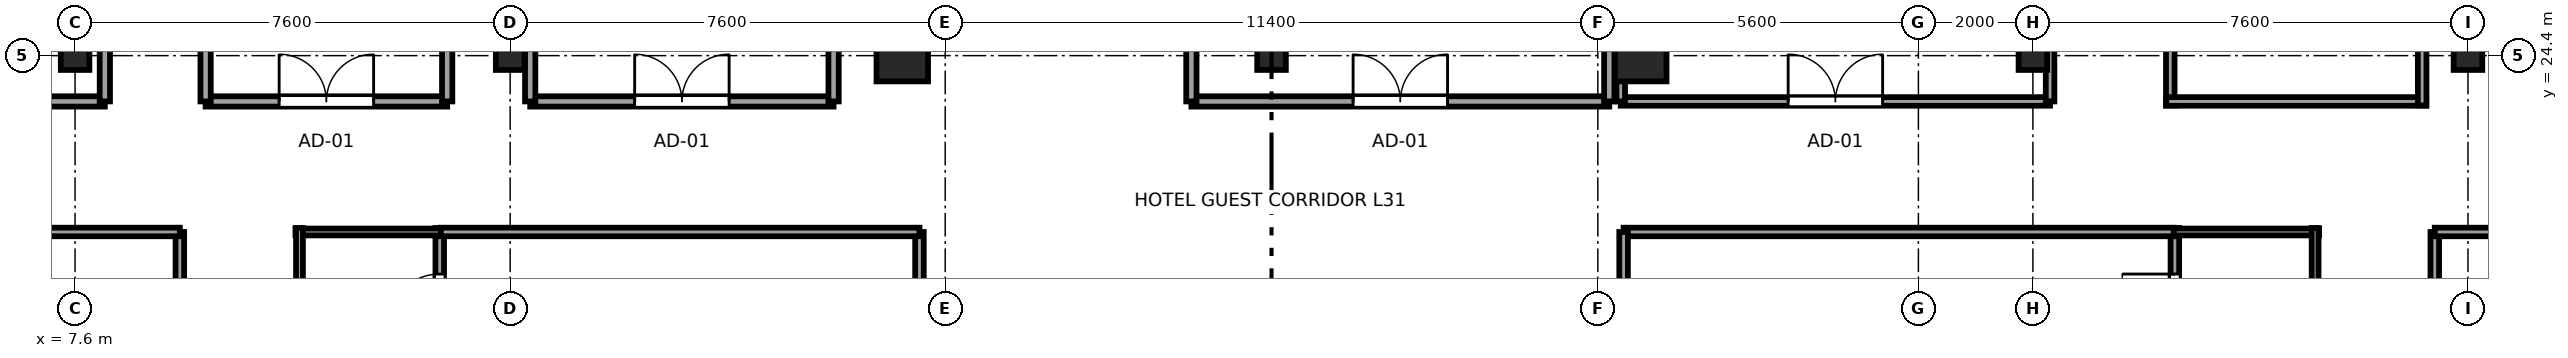
"""IFC4 building model, lengths in metres.
Left out: names, types, materials, properties, quantities, classifications, styles, units other than length and angle.
Written with IfcOpenShell. Run it as: python <this file> out.ifc"""

import sys

from ifc_helpers import new_model, si_unit, direction, frame, frame_2d, origin, origin_2d, place, context, subcontext, project, spatial, rectangle, i_section, extrude, source, transform, mapped, element, fill, save


model = new_model("IFC4")
c1 = context("Model", 3, precision=1e-05, world=origin(), true_north=direction((0.0, 1.0)))
c2 = subcontext(c1, "Body", "Model", "MODEL_VIEW")
j1 = project(units=[si_unit("LENGTHUNIT", "METRE"), si_unit("PLANEANGLEUNIT", "RADIAN")], contexts=[c1])
p1 = place(None, origin())
s1 = spatial("IfcSite", under=j1, at=p1, CompositionType="ELEMENT")
p2 = place(p1, origin())
s2 = spatial("IfcBuilding", under=s1, at=p2, CompositionType="ELEMENT")
p3 = place(p2, frame((0.0, 0.0, 122.2)))
s3 = spatial("IfcBuildingStorey", under=s2, at=p3, CompositionType="ELEMENT", Elevation=122.2)
m1 = source(origin(), c2, "Body", "SweptSolid", [
    extrude(i_section(OverallWidth=0.5, OverallDepth=0.5, WebThickness=0.022, FlangeThickness=0.034, at=origin_2d()), origin(), (0.0, 0.0, 1.0), 3.55),
])
for number, where, z_axis, x_axis in (
    (1, (7.6, 24.4, 0.0), (0.0, 0.0, 1.0), (1.0, 0.0, 0.0)),
    (2, (15.2, 24.4, 0.0), (0.0, 0.0, 1.0), (1.0, 0.0, 0.0)),
):
    element("IfcColumn", number, at=place(p3, frame(where, z_axis=z_axis, x_axis=x_axis)), inside=s3, PredefinedType="COLUMN", context=c2, shape_type="MappedRepresentation", body=[
        mapped(m1, transform((0.0, 0.0, 0.0), x_axis=(1.0, 0.0, 0.0), y_axis=(0.0, 1.0, 0.0), z_axis=(0.0, 0.0, 1.0), scale=1.0)),
    ])
m2 = source(origin(), c2, "Body", "SweptSolid", [
    extrude(rectangle(XDim=0.9, YDim=0.9, at=origin_2d()), origin(), (0.0, 0.0, 1.0), 3.55),
])
for number, where, z_axis, x_axis in (
    (3, (22.05, 24.4, 0.0), (0.0, 0.0, 1.0), (1.0, 0.0, 0.0)),
    (4, (34.95, 24.4, 0.0), (0.0, 0.0, 1.0), (1.0, 0.0, 0.0)),
):
    element("IfcColumn", number, at=place(p3, frame(where, z_axis=z_axis, x_axis=x_axis)), inside=s3, PredefinedType="COLUMN", context=c2, shape_type="MappedRepresentation", body=[
        mapped(m2, transform((0.0, 0.0, 0.0), x_axis=(1.0, 0.0, 0.0), y_axis=(0.0, 1.0, 0.0), z_axis=(0.0, 0.0, 1.0), scale=1.0)),
    ])
for number, where, z_axis, x_axis in (
    (5, (41.8, 24.4, 0.0), (0.0, 0.0, 1.0), (1.0, 0.0, 0.0)),
    (6, (49.4, 24.4, 0.0), (0.0, 0.0, 1.0), (1.0, 0.0, 0.0)),
    (7, (28.5, 24.4, 0.0), (0.0, 0.0, 1.0), (1.0, 0.0, 0.0)),
):
    element("IfcColumn", number, at=place(p3, frame(where, z_axis=z_axis, x_axis=x_axis)), inside=s3, PredefinedType="COLUMN", context=c2, shape_type="MappedRepresentation", body=[
        mapped(m1, transform((0.0, 0.0, 0.0), x_axis=(1.0, 0.0, 0.0), y_axis=(0.0, 1.0, 0.0), z_axis=(0.0, 0.0, 1.0), scale=1.0)),
    ])
p4 = place(p3, frame((13.97, 19.0, 0.0), z_axis=(0.0, 0.0, 1.0), x_axis=(0.0, 1.0, 0.0)))
e8 = element("IfcWall", 8, at=p4, inside=s3, PredefinedType="PARTITIONING", context=c2, shape_type="SweptSolid", body=[
    extrude(rectangle(XDim=2.39, YDim=0.15, at=frame_2d((1.195, 0.0))), origin(), (0.0, 0.0, 1.0), 3.37),
])
p5 = place(p4, frame((0.665, 0.0, 0.0)))
e9 = element("IfcOpeningElement", 9, at=p5, cuts=e8, PredefinedType="OPENING", context=c2, shape_type="SweptSolid", body=[
    extrude(rectangle(XDim=0.92, YDim=2.01, at=frame_2d((0.46, 1.005))), frame((0.0, 0.085, 0.0), z_axis=(0.0, -1.0, 0.0), x_axis=(1.0, 0.0, 0.0)), (0.0, 0.0, 1.0), 0.17),
])
p6 = place(p3, frame((11.45, 21.32, 0.0), z_axis=(0.0, 0.0, 1.0), x_axis=(1.0, 0.0, 0.0)))
e10 = element("IfcWall", 10, at=p6, inside=s3, PredefinedType="PLUMBINGWALL", context=c2, shape_type="SweptSolid", body=[
    extrude(rectangle(XDim=2.59, YDim=0.12, at=frame_2d((1.295, 0.0))), origin(), (0.0, 0.0, 1.0), 3.37),
])
p7 = place(p3, frame((11.52, 19.0, 0.0), z_axis=(0.0, 0.0, 1.0), x_axis=(0.0, 1.0, 0.0)))
e11 = element("IfcWall", 11, at=p7, inside=s3, PredefinedType="PLUMBINGWALL", context=c2, shape_type="SweptSolid", body=[
    extrude(rectangle(XDim=2.39, YDim=0.12, at=frame_2d((1.195, 0.0))), origin(), (0.0, 0.0, 1.0), 2.954),
])
p8 = place(p3, frame((44.28, 19.0, 0.0), z_axis=(0.0, 0.0, 1.0), x_axis=(0.0, 1.0, 0.0)))
e12 = element("IfcWall", 12, at=p8, inside=s3, PredefinedType="PARTITIONING", context=c2, shape_type="SweptSolid", body=[
    extrude(rectangle(XDim=2.39, YDim=0.15, at=frame_2d((1.195, 0.0))), origin(), (0.0, 0.0, 1.0), 3.37),
])
p9 = place(p8, frame((0.665, 0.0, 0.0)))
e13 = element("IfcOpeningElement", 13, at=p9, cuts=e12, PredefinedType="OPENING", context=c2, shape_type="SweptSolid", body=[
    extrude(rectangle(XDim=0.92, YDim=2.01, at=frame_2d((0.46, 1.005))), frame((0.0, 0.085, 0.0), z_axis=(0.0, -1.0, 0.0), x_axis=(1.0, 0.0, 0.0)), (0.0, 0.0, 1.0), 0.17),
])
p10 = place(p3, frame((44.21, 21.32, 0.0), z_axis=(0.0, 0.0, 1.0), x_axis=(1.0, 0.0, 0.0)))
e14 = element("IfcWall", 14, at=p10, inside=s3, PredefinedType="PLUMBINGWALL", context=c2, shape_type="SweptSolid", body=[
    extrude(rectangle(XDim=2.59, YDim=0.12, at=frame_2d((1.295, 0.0))), origin(), (0.0, 0.0, 1.0), 3.37),
])
p11 = place(p3, frame((46.73, 19.0, 0.0), z_axis=(0.0, 0.0, 1.0), x_axis=(0.0, 1.0, 0.0)))
e15 = element("IfcWall", 15, at=p11, inside=s3, PredefinedType="PLUMBINGWALL", context=c2, shape_type="SweptSolid", body=[
    extrude(rectangle(XDim=2.39, YDim=0.12, at=frame_2d((1.195, 0.0))), origin(), (0.0, 0.0, 1.0), 3.37),
])
p12 = place(p3, frame((9.43, 13.21, 0.0), z_axis=(0.0, 0.0, 1.0), x_axis=(0.0, 1.0, 0.0)))
e16 = element("IfcWall", 16, at=p12, inside=s3, PredefinedType="PARTITIONING", context=c2, shape_type="SweptSolid", body=[
    extrude(rectangle(XDim=8.11, YDim=0.15, at=frame_2d((4.055, 0.0))), origin(), (0.0, 0.0, 1.0), 3.37),
])
p13 = place(p12, frame((3.545, 0.0, 0.0)))
e17 = element("IfcOpeningElement", 17, at=p13, cuts=e16, PredefinedType="OPENING", context=c2, shape_type="SweptSolid", body=[
    extrude(rectangle(XDim=0.98, YDim=2.12, at=frame_2d((0.49, 1.06))), frame((0.0, 0.085, 0.0), z_axis=(0.0, -1.0, 0.0), x_axis=(1.0, 0.0, 0.0)), (0.0, 0.0, 1.0), 0.17),
])
p14 = place(p3, frame((0.405, 21.32, 0.0), z_axis=(0.0, 0.0, 1.0), x_axis=(1.0, 0.0, 0.0)))
e18 = element("IfcWall", 18, at=p14, inside=s3, PredefinedType="PARTITIONING", context=c2, shape_type="SweptSolid", body=[
    extrude(rectangle(XDim=9.025, YDim=0.15, at=frame_2d((4.512, 0.0))), origin(), (0.0, 0.0, 1.0), 3.37),
])
p15 = place(p3, frame((22.35, 8.28, 0.0), z_axis=(0.0, 0.0, 1.0), x_axis=(0.0, 1.0, 0.0)))
e19 = element("IfcWall", 19, at=p15, inside=s3, PredefinedType="PARTITIONING", context=c2, shape_type="SweptSolid", body=[
    extrude(rectangle(XDim=13.04, YDim=0.15, at=frame_2d((6.52, 0.0))), origin(), (0.0, 0.0, 1.0), 3.37),
])
p16 = place(p3, frame((13.99, 21.32, 0.0), z_axis=(0.0, 0.0, 1.0), x_axis=(1.0, 0.0, 0.0)))
e20 = element("IfcWall", 20, at=p16, inside=s3, PredefinedType="PARTITIONING", context=c2, shape_type="SweptSolid", body=[
    extrude(rectangle(XDim=8.36, YDim=0.15, at=frame_2d((4.18, 0.0))), origin(), (0.0, 0.0, 1.0), 3.37),
])
p17 = place(p3, frame((34.65, 21.32, 0.0), z_axis=(0.0, 0.0, 1.0), x_axis=(1.0, 0.0, 0.0)))
e21 = element("IfcWall", 21, at=p17, inside=s3, PredefinedType="PARTITIONING", context=c2, shape_type="SweptSolid", body=[
    extrude(rectangle(XDim=9.61, YDim=0.15, at=frame_2d((4.805, 0.0))), origin(), (0.0, 0.0, 1.0), 3.37),
])
p18 = place(p3, frame((34.65, 8.23, 0.0), z_axis=(0.0, 0.0, 1.0), x_axis=(0.0, 1.0, 0.0)))
e22 = element("IfcWall", 22, at=p18, inside=s3, PredefinedType="PARTITIONING", context=c2, shape_type="SweptSolid", body=[
    extrude(rectangle(XDim=13.09, YDim=0.15, at=frame_2d((6.545, 0.0))), origin(), (0.0, 0.0, 1.0), 3.37),
])
p19 = place(p3, frame((48.82, 13.21, 0.0), z_axis=(0.0, 0.0, 1.0), x_axis=(0.0, 1.0, 0.0)))
e23 = element("IfcWall", 23, at=p19, inside=s3, PredefinedType="PARTITIONING", context=c2, shape_type="SweptSolid", body=[
    extrude(rectangle(XDim=8.11, YDim=0.15, at=frame_2d((4.055, 0.0))), origin(), (0.0, 0.0, 1.0), 3.37),
])
p20 = place(p19, frame((4.145, 0.0, 0.0)))
e24 = element("IfcOpeningElement", 24, at=p20, cuts=e23, PredefinedType="OPENING", context=c2, shape_type="SweptSolid", body=[
    extrude(rectangle(XDim=0.98, YDim=2.12, at=frame_2d((0.49, 1.06))), frame((0.0, 0.085, 0.0), z_axis=(0.0, -1.0, 0.0), x_axis=(1.0, 0.0, 0.0)), (0.0, 0.0, 1.0), 0.17),
])
p21 = place(p3, frame((48.82, 21.32, 0.0), z_axis=(0.0, 0.0, 1.0), x_axis=(1.0, 0.0, 0.0)))
e25 = element("IfcWall", 25, at=p21, inside=s3, PredefinedType="PARTITIONING", context=c2, shape_type="SweptSolid", body=[
    extrude(rectangle(XDim=7.88, YDim=0.15, at=frame_2d((3.94, 0.0))), origin(), (0.0, 0.0, 1.0), 3.37),
])
p22 = place(p3, frame((0.405, 23.6, 0.0), z_axis=(0.0, 0.0, 1.0), x_axis=(1.0, 0.0, 0.0)))
e26 = element("IfcWall", 26, at=p22, inside=s3, PredefinedType="PARTITIONING", context=c2, shape_type="SweptSolid", body=[
    extrude(rectangle(XDim=7.715, YDim=0.18, at=frame_2d((3.857, 0.0))), origin(), (0.0, 0.0, 1.0), 3.37),
])
p23 = place(p3, frame((8.12, 23.6, 0.0), z_axis=(0.0, 0.0, 1.0), x_axis=(0.0, 1.0, 0.0)))
e27 = element("IfcWall", 27, at=p23, inside=s3, PredefinedType="PARTITIONING", context=c2, shape_type="SweptSolid", body=[
    extrude(rectangle(XDim=7.6, YDim=0.18, at=frame_2d((3.8, 0.0))), origin(), (0.0, 0.0, 1.0), 3.37),
])
p24 = place(p23, frame((2.975, 0.0, 0.0)))
e28 = element("IfcOpeningElement", 28, at=p24, cuts=e27, PredefinedType="OPENING", context=c2, shape_type="SweptSolid", body=[
    extrude(rectangle(XDim=1.65, YDim=2.15, at=frame_2d((0.825, 1.075))), frame((0.0, 0.1, 0.0), z_axis=(0.0, -1.0, 0.0), x_axis=(1.0, 0.0, 0.0)), (0.0, 0.0, 1.0), 0.2),
])
p25 = place(p3, frame((44.2, 23.53, 0.0), z_axis=(0.0, 0.0, 1.0), x_axis=(0.0, 1.0, 0.0)))
e29 = element("IfcWall", 29, at=p25, inside=s3, PredefinedType="PARTITIONING", context=c2, shape_type="SweptSolid", body=[
    extrude(rectangle(XDim=3.74, YDim=0.15, at=frame_2d((1.87, 0.0))), origin(), (0.0, 0.0, 1.0), 3.37),
])
p26 = place(p25, frame((1.24, 0.0, 0.0)))
e30 = element("IfcOpeningElement", 30, at=p26, cuts=e29, PredefinedType="OPENING", context=c2, shape_type="SweptSolid", body=[
    extrude(rectangle(XDim=0.92, YDim=2.01, at=frame_2d((0.46, 1.005))), frame((0.0, 0.085, 0.0), z_axis=(0.0, -1.0, 0.0), x_axis=(1.0, 0.0, 0.0)), (0.0, 0.0, 1.0), 0.17),
])
p27 = place(p3, frame((44.13, 23.6, 0.0), z_axis=(0.0, 0.0, 1.0), x_axis=(1.0, 0.0, 0.0)))
e31 = element("IfcWall", 31, at=p27, inside=s3, PredefinedType="PARTITIONING", context=c2, shape_type="SweptSolid", body=[
    extrude(rectangle(XDim=4.54, YDim=0.15, at=frame_2d((2.27, 0.0))), origin(), (0.0, 0.0, 1.0), 3.37),
])
p28 = place(p3, frame((48.6, 23.53, 0.0), z_axis=(0.0, 0.0, 1.0), x_axis=(0.0, 1.0, 0.0)))
e32 = element("IfcWall", 32, at=p28, inside=s3, PredefinedType="PARTITIONING", context=c2, shape_type="SweptSolid", body=[
    extrude(rectangle(XDim=3.74, YDim=0.15, at=frame_2d((1.87, 0.0))), origin(), (0.0, 0.0, 1.0), 3.37),
])
p29 = place(p3, frame((9.88, 23.6, 0.0), z_axis=(0.0, 0.0, 1.0), x_axis=(1.0, 0.0, 0.0)))
e33 = element("IfcWall", 33, at=p29, inside=s3, PredefinedType="PARTITIONING", context=c2, shape_type="SweptSolid", body=[
    extrude(rectangle(XDim=4.22, YDim=0.18, at=frame_2d((2.11, 0.0))), origin(), (0.0, 0.0, 1.0), 3.37),
])
p30 = place(p29, frame((1.285, 0.0, 0.0)))
e34 = element("IfcOpeningElement", 34, at=p30, cuts=e33, PredefinedType="OPENING", context=c2, shape_type="SweptSolid", body=[
    extrude(rectangle(XDim=1.65, YDim=2.15, at=frame_2d((0.825, 1.075))), frame((0.0, 0.1, 0.0), z_axis=(0.0, -1.0, 0.0), x_axis=(1.0, 0.0, 0.0)), (0.0, 0.0, 1.0), 0.2),
])
for number, where, z_axis, x_axis in (
    (35, (9.88, 23.6, 0.0), (0.0, 0.0, 1.0), (0.0, 1.0, 0.0)),
    (36, (14.1, 23.6, 0.0), (0.0, 0.0, 1.0), (0.0, 1.0, 0.0)),
):
    element("IfcWall", number, at=place(p3, frame(where, z_axis=z_axis, x_axis=x_axis)), inside=s3, PredefinedType="PARTITIONING", context=c2, shape_type="SweptSolid", body=[
        extrude(rectangle(XDim=6.15, YDim=0.18, at=frame_2d((3.075, 0.0))), origin(), (0.0, 0.0, 1.0), 3.37),
    ])
p31 = place(p3, frame((27.1, 23.6, 0.0), z_axis=(0.0, 0.0, 1.0), x_axis=(1.0, 0.0, 0.0)))
e37 = element("IfcWall", 37, at=p31, inside=s3, PredefinedType="PARTITIONING", context=c2, shape_type="SweptSolid", body=[
    extrude(rectangle(XDim=7.3, YDim=0.18, at=frame_2d((3.65, 0.0))), origin(), (0.0, 0.0, 1.0), 3.37),
])
p32 = place(p31, frame((2.825, 0.0, 0.0)))
e38 = element("IfcOpeningElement", 38, at=p32, cuts=e37, PredefinedType="OPENING", context=c2, shape_type="SweptSolid", body=[
    extrude(rectangle(XDim=1.65, YDim=2.15, at=frame_2d((0.825, 1.075))), frame((0.0, 0.1, 0.0), z_axis=(0.0, -1.0, 0.0), x_axis=(1.0, 0.0, 0.0)), (0.0, 0.0, 1.0), 0.2),
])
for number, where, z_axis, x_axis in (
    (39, (27.1, 23.6, 0.0), (0.0, 0.0, 1.0), (0.0, 1.0, 0.0)),
    (40, (34.4, 23.6, 0.0), (0.0, 0.0, 1.0), (0.0, 1.0, 0.0)),
):
    element("IfcWall", number, at=place(p3, frame(where, z_axis=z_axis, x_axis=x_axis)), inside=s3, PredefinedType="PARTITIONING", context=c2, shape_type="SweptSolid", body=[
        extrude(rectangle(XDim=6.2, YDim=0.18, at=frame_2d((3.1, 0.0))), origin(), (0.0, 0.0, 1.0), 3.37),
    ])
p33 = place(p3, frame((15.55, 23.6, 0.0), z_axis=(0.0, 0.0, 1.0), x_axis=(1.0, 0.0, 0.0)))
e41 = element("IfcWall", 41, at=p33, inside=s3, PredefinedType="PARTITIONING", context=c2, shape_type="SweptSolid", body=[
    extrude(rectangle(XDim=5.3, YDim=0.18, at=frame_2d((2.65, 0.0))), origin(), (0.0, 0.0, 1.0), 3.37),
])
p34 = place(p33, frame((1.825, 0.0, 0.0)))
e42 = element("IfcOpeningElement", 42, at=p34, cuts=e41, PredefinedType="OPENING", context=c2, shape_type="SweptSolid", body=[
    extrude(rectangle(XDim=1.65, YDim=2.15, at=frame_2d((0.825, 1.075))), frame((0.0, 0.1, 0.0), z_axis=(0.0, -1.0, 0.0), x_axis=(1.0, 0.0, 0.0)), (0.0, 0.0, 1.0), 0.2),
])
for number, where, z_axis, x_axis in (
    (43, (15.55, 23.6, 0.0), (0.0, 0.0, 1.0), (0.0, 1.0, 0.0)),
    (44, (20.85, 23.6, 0.0), (0.0, 0.0, 1.0), (0.0, 1.0, 0.0)),
):
    element("IfcWall", number, at=place(p3, frame(where, z_axis=z_axis, x_axis=x_axis)), inside=s3, PredefinedType="PARTITIONING", context=c2, shape_type="SweptSolid", body=[
        extrude(rectangle(XDim=6.2, YDim=0.18, at=frame_2d((3.1, 0.0))), origin(), (0.0, 0.0, 1.0), 3.37),
    ])
p35 = place(p3, frame((34.6, 23.6, 0.0), z_axis=(0.0, 0.0, 1.0), x_axis=(1.0, 0.0, 0.0)))
e45 = element("IfcWall", 45, at=p35, inside=s3, PredefinedType="PARTITIONING", context=c2, shape_type="SweptSolid", body=[
    extrude(rectangle(XDim=7.5, YDim=0.15, at=frame_2d((3.75, 0.0))), origin(), (0.0, 0.0, 1.0), 3.37),
])
p36 = place(p35, frame((2.925, 0.0, 0.0)))
e46 = element("IfcOpeningElement", 46, at=p36, cuts=e45, PredefinedType="OPENING", context=c2, shape_type="SweptSolid", body=[
    extrude(rectangle(XDim=1.65, YDim=2.15, at=frame_2d((0.825, 1.075))), frame((0.0, 0.085, 0.0), z_axis=(0.0, -1.0, 0.0), x_axis=(1.0, 0.0, 0.0)), (0.0, 0.0, 1.0), 0.17),
])
p37 = place(p3, frame((34.6, 23.6, 0.0), z_axis=(0.0, 0.0, 1.0), x_axis=(0.0, 1.0, 0.0)))
e47 = element("IfcWall", 47, at=p37, inside=s3, PredefinedType="PARTITIONING", context=c2, shape_type="SweptSolid", body=[
    extrude(rectangle(XDim=5.8, YDim=0.15, at=frame_2d((2.9, 0.0))), origin(), (0.0, 0.0, 1.0), 3.37),
])
p38 = place(p3, frame((42.1, 23.6, 0.0), z_axis=(0.0, 0.0, 1.0), x_axis=(0.0, 1.0, 0.0)))
e48 = element("IfcWall", 48, at=p38, inside=s3, PredefinedType="PARTITIONING", context=c2, shape_type="SweptSolid", body=[
    extrude(rectangle(XDim=5.8, YDim=0.15, at=frame_2d((2.9, 0.0))), origin(), (0.0, 0.0, 1.0), 2.16),
])
m3 = source(origin(), c2, "Body", "SweptSolid", [
    extrude(rectangle(XDim=0.92, YDim=2.01, at=frame_2d((0.46, 1.005))), frame((0.0, 0.025, 0.0), z_axis=(0.0, -1.0, 0.0), x_axis=(1.0, 0.0, 0.0)), (0.0, 0.0, 1.0), 0.05),
])
p39 = place(p5, origin())
e49 = element("IfcDoor", 49, at=p39, inside=s3, OperationType="SINGLE_SWING_LEFT", PredefinedType="DOOR", context=c2, shape_type="MappedRepresentation", body=[
    mapped(m3, transform((0.0, 0.0, 0.0), x_axis=(1.0, 0.0, 0.0), y_axis=(0.0, 1.0, 0.0), z_axis=(0.0, 0.0, 1.0), scale=1.0)),
])
fill(e9, e49)
p40 = place(p9, origin())
e50 = element("IfcDoor", 50, at=p40, inside=s3, OperationType="SINGLE_SWING_RIGHT", PredefinedType="DOOR", context=c2, shape_type="MappedRepresentation", body=[
    mapped(m3, transform((0.0, 0.0, 0.0), x_axis=(1.0, 0.0, 0.0), y_axis=(0.0, 1.0, 0.0), z_axis=(0.0, 0.0, 1.0), scale=1.0)),
])
fill(e13, e50)
m4 = source(origin(), c2, "Body", "SweptSolid", [
    extrude(rectangle(XDim=1.65, YDim=2.15, at=frame_2d((0.825, 1.075))), frame((0.0, 0.025, 0.0), z_axis=(0.0, -1.0, 0.0), x_axis=(1.0, 0.0, 0.0)), (0.0, 0.0, 1.0), 0.05),
])
p41 = place(p30, origin())
e51 = element("IfcDoor", 51, at=p41, inside=s3, OperationType="DOUBLE_DOOR_SINGLE_SWING", PredefinedType="DOOR", context=c2, shape_type="MappedRepresentation", body=[
    mapped(m4, transform((0.0, 0.0, 0.0), x_axis=(1.0, 0.0, 0.0), y_axis=(0.0, 1.0, 0.0), z_axis=(0.0, 0.0, 1.0), scale=1.0)),
])
fill(e34, e51)
p42 = place(p32, origin())
e52 = element("IfcDoor", 52, at=p42, inside=s3, OperationType="DOUBLE_DOOR_SINGLE_SWING", PredefinedType="DOOR", context=c2, shape_type="MappedRepresentation", body=[
    mapped(m4, transform((0.0, 0.0, 0.0), x_axis=(1.0, 0.0, 0.0), y_axis=(0.0, 1.0, 0.0), z_axis=(0.0, 0.0, 1.0), scale=1.0)),
])
fill(e38, e52)
p43 = place(p34, origin())
e53 = element("IfcDoor", 53, at=p43, inside=s3, OperationType="DOUBLE_DOOR_SINGLE_SWING", PredefinedType="DOOR", context=c2, shape_type="MappedRepresentation", body=[
    mapped(m4, transform((0.0, 0.0, 0.0), x_axis=(1.0, 0.0, 0.0), y_axis=(0.0, 1.0, 0.0), z_axis=(0.0, 0.0, 1.0), scale=1.0)),
])
fill(e42, e53)
p44 = place(p36, origin())
e54 = element("IfcDoor", 54, at=p44, inside=s3, OperationType="DOUBLE_DOOR_SINGLE_SWING", PredefinedType="DOOR", context=c2, shape_type="MappedRepresentation", body=[
    mapped(m4, transform((0.0, 0.0, 0.0), x_axis=(1.0, 0.0, 0.0), y_axis=(0.0, 1.0, 0.0), z_axis=(0.0, 0.0, 1.0), scale=1.0)),
])
fill(e46, e54)
save(model, sys.argv[1])
